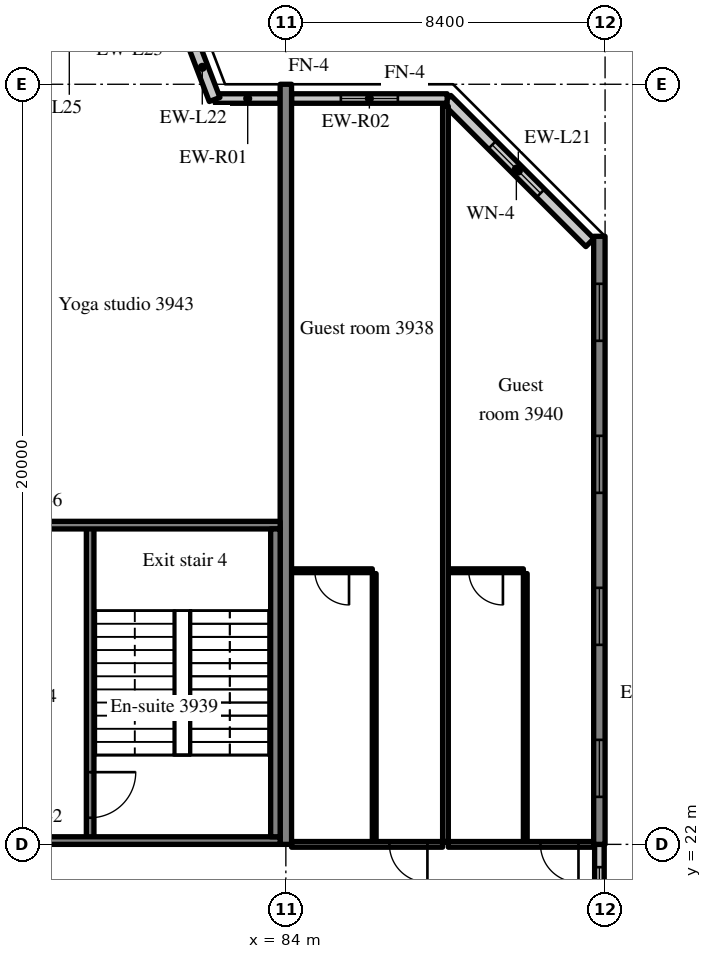
"""IFC4 building model, lengths in metres.
Left out: names, types, materials, properties, quantities, classifications, styles, units other than length and angle.
Written with IfcOpenShell. Run it as: python <this file> out.ifc"""

import sys

from ifc_helpers import new_model, si_unit, direction, frame, frame_2d, origin, place, context, subcontext, project, spatial, rectangle, extrude, source, transform, mapped, element, fill, save


model = new_model("IFC4")
c1 = context("Model", 3, precision=1e-05, world=origin(), true_north=direction((0.0, 1.0)))
c2 = subcontext(c1, "Body", "Model", "MODEL_VIEW")
j1 = project(units=[si_unit("LENGTHUNIT", "METRE"), si_unit("PLANEANGLEUNIT", "RADIAN")], contexts=[c1])
p1 = place(None, origin())
s1 = spatial("IfcSite", under=j1, at=p1, CompositionType="ELEMENT")
p2 = place(p1, origin())
s2 = spatial("IfcBuilding", under=s1, at=p2, CompositionType="ELEMENT")
p3 = place(p2, frame((0.0, 0.0, 163.0)))
s3 = spatial("IfcBuildingStorey", under=s2, at=p3, CompositionType="ELEMENT", Elevation=163.0)
m1 = source(origin(), c2, "Body", "SweptSolid", [
    extrude(rectangle(XDim=20.0, YDim=0.3, at=frame_2d((10.0, 0.0))), origin(), (0.0, 0.0, 1.0), 3.52),
])
p4 = place(p3, frame((84.0, 22.0, 0.0), z_axis=(0.0, 0.0, 1.0), x_axis=(0.0, 1.0, 0.0)))
e1 = element("IfcWall", 1, at=p4, inside=s3, PredefinedType="SHEAR", context=c2, shape_type="MappedRepresentation", body=[
    mapped(m1, transform((0.0, 0.0, 0.0), scale=1.0)),
])
m2 = source(origin(), c2, "Body", "SweptSolid", [
    extrude(rectangle(XDim=16.0, YDim=0.3, at=frame_2d((8.0, 0.0))), origin(), (0.0, 0.0, 1.0), 3.52),
])
p5 = place(p3, frame((92.25, 22.0, 0.0), z_axis=(0.0, 0.0, 1.0), x_axis=(0.0, 1.0, 0.0)))
e2 = element("IfcWall", 2, at=p5, inside=s3, PredefinedType="SHEAR", context=c2, shape_type="MappedRepresentation", body=[
    mapped(m2, transform((0.0, 0.0, 0.0), scale=1.0)),
])
m3 = source(origin(), c2, "Body", "SweptSolid", [
    extrude(rectangle(XDim=1.5, YDim=1.5, at=frame_2d((0.75, 0.75))), frame((0.0, 0.16, 0.0), z_axis=(0.0, -1.0, 0.0), x_axis=(1.0, 0.0, 0.0)), (0.0, 0.0, 1.0), 0.32),
])
p6 = place(p5, frame((1.25, 0.0, 0.9)))
e3 = element("IfcOpeningElement", 3, at=p6, cuts=e2, PredefinedType="OPENING", context=c2, shape_type="MappedRepresentation", body=[
    mapped(m3, transform((0.0, 0.0, 0.0), scale=1.0)),
])
p7 = place(p5, frame((5.25, 0.0, 0.9)))
e4 = element("IfcOpeningElement", 4, at=p7, cuts=e2, PredefinedType="OPENING", context=c2, shape_type="MappedRepresentation", body=[
    mapped(m3, transform((0.0, 0.0, 0.0), scale=1.0)),
])
p8 = place(p5, frame((9.25, 0.0, 0.9)))
e5 = element("IfcOpeningElement", 5, at=p8, cuts=e2, PredefinedType="OPENING", context=c2, shape_type="MappedRepresentation", body=[
    mapped(m3, transform((0.0, 0.0, 0.0), scale=1.0)),
])
p9 = place(p5, frame((13.25, 0.0, 0.9)))
e6 = element("IfcOpeningElement", 6, at=p9, cuts=e2, PredefinedType="OPENING", context=c2, shape_type="MappedRepresentation", body=[
    mapped(m3, transform((0.0, 0.0, 0.0), scale=1.0)),
])
m4 = source(origin(), c2, "Body", "SweptSolid", [
    extrude(rectangle(XDim=5.326, YDim=0.3, at=frame_2d((2.663, 0.0))), origin(), (0.0, 0.0, 1.0), 3.52),
])
p10 = place(p3, frame((92.0, 37.834, 0.0), z_axis=(0.0, 0.0, 1.0), x_axis=(-0.707083859269, 0.707129702361, 0.0)))
e7 = element("IfcWall", 7, at=p10, inside=s3, PredefinedType="SOLIDWALL", context=c2, shape_type="MappedRepresentation", body=[
    mapped(m4, transform((0.0, 0.0, 0.0), scale=1.0)),
])
m5 = source(origin(), c2, "Body", "SweptSolid", [
    extrude(rectangle(XDim=1.8, YDim=1.5, at=frame_2d((0.9, 0.75))), frame((0.0, 0.16, 0.0), z_axis=(0.0, -1.0, 0.0), x_axis=(1.0, 0.0, 0.0)), (0.0, 0.0, 1.0), 0.32),
])
p11 = place(p10, frame((1.836, 0.0, 0.9)))
e8 = element("IfcOpeningElement", 8, at=p11, cuts=e7, PredefinedType="OPENING", context=c2, shape_type="MappedRepresentation", body=[
    mapped(m5, transform((0.0, 0.0, 0.0), scale=1.0)),
])
m6 = source(origin(), c2, "Body", "SweptSolid", [
    extrude(rectangle(XDim=1.708, YDim=0.25, at=frame_2d((0.854, 0.0))), origin(), (0.0, 0.0, 1.0), 2.87),
])
p12 = place(p3, frame((83.85, 41.625, 0.0), z_axis=(0.0, 0.0, 1.0), x_axis=(-1.0, 0.0, 0.0)))
e9 = element("IfcWall", 9, at=p12, inside=s3, PredefinedType="SOLIDWALL", context=c2, shape_type="MappedRepresentation", body=[
    mapped(m6, transform((0.0, 0.0, 0.0), scale=1.0)),
])
m7 = source(origin(), c2, "Body", "SweptSolid", [
    extrude(rectangle(XDim=4.095, YDim=0.25, at=frame_2d((2.047, 0.0))), origin(), (0.0, 0.0, 1.0), 2.87),
])
p13 = place(p3, frame((88.245, 41.625, 0.0), z_axis=(0.0, 0.0, 1.0), x_axis=(-1.0, 0.0, 0.0)))
e10 = element("IfcWall", 10, at=p13, inside=s3, PredefinedType="SOLIDWALL", context=c2, shape_type="MappedRepresentation", body=[
    mapped(m7, transform((0.0, 0.0, 0.0), scale=1.0)),
])
m8 = source(origin(), c2, "Body", "SweptSolid", [
    extrude(rectangle(XDim=1.5, YDim=1.5, at=frame_2d((0.75, 0.75))), frame((0.0, 0.135, 0.0), z_axis=(0.0, -1.0, 0.0), x_axis=(1.0, 0.0, 0.0)), (0.0, 0.0, 1.0), 0.27),
])
p14 = place(p13, frame((1.297, 0.0, 0.9)))
e11 = element("IfcOpeningElement", 11, at=p14, cuts=e10, PredefinedType="OPENING", context=c2, shape_type="MappedRepresentation", body=[
    mapped(m8, transform((0.0, 0.0, 0.0), scale=1.0)),
])
m9 = source(origin(), c2, "Body", "SweptSolid", [
    extrude(rectangle(XDim=1.812, YDim=0.3, at=frame_2d((0.906, 0.0))), origin(), (0.0, 0.0, 1.0), 3.52),
])
p15 = place(p3, frame((82.125, 41.6, 0.0), z_axis=(0.0, 0.0, 1.0), x_axis=(-0.357877270961, 0.93376863244, 0.0)))
e12 = element("IfcWall", 12, at=p15, inside=s3, PredefinedType="SOLIDWALL", context=c2, shape_type="MappedRepresentation", body=[
    mapped(m9, transform((0.0, 0.0, 0.0), scale=1.0)),
])
m10 = source(origin(), c2, "Body", "SweptSolid", [
    extrude(rectangle(XDim=2.4, YDim=0.25, at=frame_2d((1.2, 0.0))), origin(), (0.0, 0.0, 1.0), 2.62),
])
p16 = place(p3, frame((92.25, 19.6, 0.0), z_axis=(0.0, 0.0, 1.0), x_axis=(0.0, 1.0, 0.0)))
e13 = element("IfcWall", 13, at=p16, inside=s3, PredefinedType="SOLIDWALL", context=c2, shape_type="MappedRepresentation", body=[
    mapped(m10, transform((0.0, 0.0, 0.0), scale=1.0)),
])
m11 = source(origin(), c2, "Body", "SweptSolid", [
    extrude(rectangle(XDim=1.2, YDim=1.5, at=frame_2d((0.6, 0.75))), frame((0.0, 0.135, 0.0), z_axis=(0.0, -1.0, 0.0), x_axis=(1.0, 0.0, 0.0)), (0.0, 0.0, 1.0), 0.27),
])
p17 = place(p16, frame((0.6, 0.0, 0.9)))
e14 = element("IfcOpeningElement", 14, at=p17, cuts=e13, PredefinedType="OPENING", context=c2, shape_type="MappedRepresentation", body=[
    mapped(m11, transform((0.0, 0.0, 0.0), scale=1.0)),
])
m12 = source(origin(), c2, "Body", "SweptSolid", [
    extrude(rectangle(XDim=8.3, YDim=0.2, at=frame_2d((4.15, 0.0))), origin(), (0.0, 0.0, 1.0), 3.52),
])
p18 = place(p3, frame((78.85, 22.1, 0.0), z_axis=(0.0, 0.0, 1.0), x_axis=(0.0, 1.0, 0.0)))
e15 = element("IfcWall", 15, at=p18, inside=s3, PredefinedType="SOLIDWALL", context=c2, shape_type="MappedRepresentation", body=[
    mapped(m12, transform((0.0, 0.0, 0.0), scale=1.0)),
])
m13 = source(origin(), c2, "Body", "SweptSolid", [
    extrude(rectangle(XDim=1.2, YDim=2.1, at=frame_2d((0.6, 1.05))), frame((0.0, 0.11, 0.0), z_axis=(0.0, -1.0, 0.0), x_axis=(1.0, 0.0, 0.0)), (0.0, 0.0, 1.0), 0.22),
])
p19 = place(p18, frame((0.6, 0.0, 0.0)))
e16 = element("IfcOpeningElement", 16, at=p19, cuts=e15, PredefinedType="OPENING", context=c2, shape_type="MappedRepresentation", body=[
    mapped(m13, transform((0.0, 0.0, 0.0), scale=1.0)),
])
m14 = source(origin(), c2, "Body", "SweptSolid", [
    extrude(rectangle(XDim=8.25, YDim=0.2, at=frame_2d((4.125, 0.0))), origin(), (0.0, 0.0, 1.0), 3.52),
])
p20 = place(p3, frame((83.85, 22.1, 0.0), z_axis=(0.0, 0.0, 1.0), x_axis=(-1.0, 0.0, 0.0)))
e17 = element("IfcWall", 17, at=p20, inside=s3, PredefinedType="SOLIDWALL", context=c2, shape_type="MappedRepresentation", body=[
    mapped(m14, transform((0.0, 0.0, 0.0), scale=1.0)),
])
p21 = place(p20, frame((6.05, 0.0, 0.0)))
e18 = element("IfcOpeningElement", 18, at=p21, cuts=e17, PredefinedType="OPENING", context=c2, shape_type="MappedRepresentation", body=[
    mapped(m13, transform((0.0, 0.0, 0.0), scale=1.0)),
])
p22 = place(p3, frame((83.85, 30.4, 0.0), z_axis=(0.0, 0.0, 1.0), x_axis=(-1.0, 0.0, 0.0)))
e19 = element("IfcWall", 19, at=p22, inside=s3, PredefinedType="SOLIDWALL", context=c2, shape_type="MappedRepresentation", body=[
    mapped(m14, transform((0.0, 0.0, 0.0), scale=1.0)),
])
m15 = source(origin(), c2, "Body", "SweptSolid", [
    extrude(rectangle(XDim=1.0, YDim=2.1, at=frame_2d((0.5, 1.05))), frame((0.0, 0.11, 0.0), z_axis=(0.0, -1.0, 0.0), x_axis=(1.0, 0.0, 0.0)), (0.0, 0.0, 1.0), 0.22),
])
p23 = place(p22, frame((6.15, 0.0, 0.0)))
e20 = element("IfcOpeningElement", 20, at=p23, cuts=e19, PredefinedType="OPENING", context=c2, shape_type="MappedRepresentation", body=[
    mapped(m15, transform((0.0, 0.0, 0.0), scale=1.0)),
])
m16 = source(origin(), c2, "Body", "SweptSolid", [
    extrude(rectangle(XDim=8.1, YDim=0.25, at=frame_2d((4.05, 0.0))), origin(), (0.0, 0.0, 1.0), 3.52),
])
p24 = place(p3, frame((83.725, 22.2, 0.0), z_axis=(0.0, 0.0, 1.0), x_axis=(0.0, 1.0, 0.0)))
e21 = element("IfcWall", 21, at=p24, inside=s3, PredefinedType="SOLIDWALL", context=c2, shape_type="MappedRepresentation", body=[
    mapped(m16, transform((0.0, 0.0, 0.0), scale=1.0)),
])
m17 = source(origin(), c2, "Body", "SweptSolid", [
    extrude(rectangle(XDim=7.05, YDim=0.1, at=frame_2d((3.525, 0.0))), origin(), (0.0, 0.0, 1.0), 3.52),
])
p25 = place(p3, frame((86.325, 22.075, 0.0), z_axis=(0.0, 0.0, 1.0), x_axis=(0.0, 1.0, 0.0)))
e22 = element("IfcWall", 22, at=p25, inside=s3, PredefinedType="PARTITIONING", context=c2, shape_type="MappedRepresentation", body=[
    mapped(m17, transform((0.0, 0.0, 0.0), scale=1.0)),
])
m18 = source(origin(), c2, "Body", "SweptSolid", [
    extrude(rectangle(XDim=2.125, YDim=0.1, at=frame_2d((1.062, 0.0))), origin(), (0.0, 0.0, 1.0), 3.52),
])
p26 = place(p3, frame((84.15, 29.2, 0.0), z_axis=(0.0, 0.0, 1.0), x_axis=(1.0, 0.0, 0.0)))
e23 = element("IfcWall", 23, at=p26, inside=s3, PredefinedType="PARTITIONING", context=c2, shape_type="MappedRepresentation", body=[
    mapped(m18, transform((0.0, 0.0, 0.0), scale=1.0)),
])
m19 = source(origin(), c2, "Body", "SweptSolid", [
    extrude(rectangle(XDim=0.9, YDim=2.1, at=frame_2d((0.45, 1.05))), frame((0.0, 0.06, 0.0), z_axis=(0.0, -1.0, 0.0), x_axis=(1.0, 0.0, 0.0)), (0.0, 0.0, 1.0), 0.12),
])
p27 = place(p26, frame((0.612, 0.0, 0.0)))
e24 = element("IfcOpeningElement", 24, at=p27, cuts=e23, PredefinedType="OPENING", context=c2, shape_type="MappedRepresentation", body=[
    mapped(m19, transform((0.0, 0.0, 0.0), scale=1.0)),
])
m20 = source(origin(), c2, "Body", "SweptSolid", [
    extrude(rectangle(XDim=3.975, YDim=0.15, at=frame_2d((1.988, 0.0))), origin(), (0.0, 0.0, 1.0), 2.82),
])
p28 = place(p3, frame((84.15, 22.0, 0.0), z_axis=(0.0, 0.0, 1.0), x_axis=(1.0, 0.0, 0.0)))
e25 = element("IfcWall", 25, at=p28, inside=s3, PredefinedType="PARTITIONING", context=c2, shape_type="MappedRepresentation", body=[
    mapped(m20, transform((0.0, 0.0, 0.0), scale=1.0)),
])
m21 = source(origin(), c2, "Body", "SweptSolid", [
    extrude(rectangle(XDim=1.0, YDim=2.1, at=frame_2d((0.5, 1.05))), frame((0.0, 0.085, 0.0), z_axis=(0.0, -1.0, 0.0), x_axis=(1.0, 0.0, 0.0)), (0.0, 0.0, 1.0), 0.17),
])
p29 = place(p28, frame((2.575, 0.0, 0.0)))
e26 = element("IfcOpeningElement", 26, at=p29, cuts=e25, PredefinedType="OPENING", context=c2, shape_type="MappedRepresentation", body=[
    mapped(m21, transform((0.0, 0.0, 0.0), scale=1.0)),
])
p30 = place(p3, frame((90.3, 22.075, 0.0), z_axis=(0.0, 0.0, 1.0), x_axis=(0.0, 1.0, 0.0)))
e27 = element("IfcWall", 27, at=p30, inside=s3, PredefinedType="PARTITIONING", context=c2, shape_type="MappedRepresentation", body=[
    mapped(m17, transform((0.0, 0.0, 0.0), scale=1.0)),
])
m22 = source(origin(), c2, "Body", "SweptSolid", [
    extrude(rectangle(XDim=1.975, YDim=0.1, at=frame_2d((0.988, 0.0))), origin(), (0.0, 0.0, 1.0), 3.52),
])
p31 = place(p3, frame((88.275, 29.2, 0.0), z_axis=(0.0, 0.0, 1.0), x_axis=(1.0, 0.0, 0.0)))
e28 = element("IfcWall", 28, at=p31, inside=s3, PredefinedType="PARTITIONING", context=c2, shape_type="MappedRepresentation", body=[
    mapped(m22, transform((0.0, 0.0, 0.0), scale=1.0)),
])
p32 = place(p31, frame((0.537, 0.0, 0.0)))
e29 = element("IfcOpeningElement", 29, at=p32, cuts=e28, PredefinedType="OPENING", context=c2, shape_type="MappedRepresentation", body=[
    mapped(m19, transform((0.0, 0.0, 0.0), scale=1.0)),
])
m23 = source(origin(), c2, "Body", "SweptSolid", [
    extrude(rectangle(XDim=3.825, YDim=0.15, at=frame_2d((1.913, 0.0))), origin(), (0.0, 0.0, 1.0), 2.82),
])
p33 = place(p3, frame((88.275, 22.0, 0.0), z_axis=(0.0, 0.0, 1.0), x_axis=(1.0, 0.0, 0.0)))
e30 = element("IfcWall", 30, at=p33, inside=s3, PredefinedType="PARTITIONING", context=c2, shape_type="MappedRepresentation", body=[
    mapped(m23, transform((0.0, 0.0, 0.0), scale=1.0)),
])
p34 = place(p33, frame((2.425, 0.0, 0.0)))
e31 = element("IfcOpeningElement", 31, at=p34, cuts=e30, PredefinedType="OPENING", context=c2, shape_type="MappedRepresentation", body=[
    mapped(m21, transform((0.0, 0.0, 0.0), scale=1.0)),
])
m24 = source(origin(), c2, "Body", "SweptSolid", [
    extrude(rectangle(XDim=19.347, YDim=0.15, at=frame_2d((9.674, 0.0))), origin(), (0.0, 0.0, 1.0), 3.52),
])
p35 = place(p3, frame((88.2, 22.075, 0.0), z_axis=(0.0, 0.0, 1.0), x_axis=(0.0, 1.0, 0.0)))
e32 = element("IfcWall", 32, at=p35, inside=s3, PredefinedType="PARTITIONING", context=c2, shape_type="MappedRepresentation", body=[
    mapped(m24, transform((0.0, 0.0, 0.0), scale=1.0)),
])
m25 = source(origin(), c2, "Body", "SweptSolid", [
    extrude(rectangle(XDim=1.8, YDim=1.5, at=frame_2d((0.9, 0.75))), frame((0.0, 0.03, 0.0), z_axis=(0.0, -1.0, 0.0), x_axis=(1.0, 0.0, 0.0)), (0.0, 0.0, 1.0), 0.06),
])
p36 = place(p11, origin())
e33 = element("IfcWindow", 33, at=p36, inside=s3, PartitioningType="SINGLE_PANEL", PredefinedType="WINDOW", context=c2, shape_type="MappedRepresentation", body=[
    mapped(m25, transform((0.0, 0.0, 0.0), scale=1.0)),
])
fill(e8, e33)
m26 = source(origin(), c2, "Body", "SweptSolid", [
    extrude(rectangle(XDim=1.5, YDim=1.5, at=frame_2d((0.75, 0.75))), frame((0.0, 0.03, 0.0), z_axis=(0.0, -1.0, 0.0), x_axis=(1.0, 0.0, 0.0)), (0.0, 0.0, 1.0), 0.06),
])
p37 = place(p14, origin())
e34 = element("IfcWindow", 34, at=p37, inside=s3, PartitioningType="SINGLE_PANEL", PredefinedType="WINDOW", context=c2, shape_type="MappedRepresentation", body=[
    mapped(m26, transform((0.0, 0.0, 0.0), scale=1.0)),
])
fill(e11, e34)
p38 = place(p6, origin())
e35 = element("IfcWindow", 35, at=p38, inside=s3, PartitioningType="SINGLE_PANEL", PredefinedType="WINDOW", context=c2, shape_type="MappedRepresentation", body=[
    mapped(m26, transform((0.0, 0.0, 0.0), scale=1.0)),
])
fill(e3, e35)
p39 = place(p7, origin())
e36 = element("IfcWindow", 36, at=p39, inside=s3, PartitioningType="SINGLE_PANEL", PredefinedType="WINDOW", context=c2, shape_type="MappedRepresentation", body=[
    mapped(m26, transform((0.0, 0.0, 0.0), scale=1.0)),
])
fill(e4, e36)
p40 = place(p8, origin())
e37 = element("IfcWindow", 37, at=p40, inside=s3, PartitioningType="SINGLE_PANEL", PredefinedType="WINDOW", context=c2, shape_type="MappedRepresentation", body=[
    mapped(m26, transform((0.0, 0.0, 0.0), scale=1.0)),
])
fill(e5, e37)
p41 = place(p9, origin())
e38 = element("IfcWindow", 38, at=p41, inside=s3, PartitioningType="SINGLE_PANEL", PredefinedType="WINDOW", context=c2, shape_type="MappedRepresentation", body=[
    mapped(m26, transform((0.0, 0.0, 0.0), scale=1.0)),
])
fill(e6, e38)
m27 = source(origin(), c2, "Body", "SweptSolid", [
    extrude(rectangle(XDim=1.2, YDim=1.5, at=frame_2d((0.6, 0.75))), frame((0.0, 0.03, 0.0), z_axis=(0.0, -1.0, 0.0), x_axis=(1.0, 0.0, 0.0)), (0.0, 0.0, 1.0), 0.06),
])
p42 = place(p17, origin())
e39 = element("IfcWindow", 39, at=p42, inside=s3, PartitioningType="SINGLE_PANEL", PredefinedType="WINDOW", context=c2, shape_type="MappedRepresentation", body=[
    mapped(m27, transform((0.0, 0.0, 0.0), scale=1.0)),
])
fill(e14, e39)
m28 = source(origin(), c2, "Body", "SweptSolid", [
    extrude(rectangle(XDim=1.2, YDim=2.1, at=frame_2d((0.6, 1.05))), frame((0.0, 0.025, 0.0), z_axis=(0.0, -1.0, 0.0), x_axis=(1.0, 0.0, 0.0)), (0.0, 0.0, 1.0), 0.05),
])
p43 = place(p19, origin())
e40 = element("IfcDoor", 40, at=p43, inside=s3, OperationType="SINGLE_SWING_RIGHT", PredefinedType="DOOR", context=c2, shape_type="MappedRepresentation", body=[
    mapped(m28, transform((0.0, 0.0, 0.0), scale=1.0)),
])
fill(e16, e40)
m29 = source(origin(), c2, "Body", "SweptSolid", [
    extrude(rectangle(XDim=0.9, YDim=2.1, at=frame_2d((0.45, 1.05))), frame((0.0, 0.025, 0.0), z_axis=(0.0, -1.0, 0.0), x_axis=(1.0, 0.0, 0.0)), (0.0, 0.0, 1.0), 0.05),
])
p44 = place(p27, origin())
e41 = element("IfcDoor", 41, at=p44, inside=s3, OperationType="SINGLE_SWING_RIGHT", PredefinedType="DOOR", context=c2, shape_type="MappedRepresentation", body=[
    mapped(m29, transform((0.0, 0.0, 0.0), scale=1.0)),
])
fill(e24, e41)
m30 = source(origin(), c2, "Body", "SweptSolid", [
    extrude(rectangle(XDim=1.0, YDim=2.1, at=frame_2d((0.5, 1.05))), frame((0.0, 0.025, 0.0), z_axis=(0.0, -1.0, 0.0), x_axis=(1.0, 0.0, 0.0)), (0.0, 0.0, 1.0), 0.05),
])
p45 = place(p29, origin())
e42 = element("IfcDoor", 42, at=p45, inside=s3, OperationType="SINGLE_SWING_RIGHT", PredefinedType="DOOR", context=c2, shape_type="MappedRepresentation", body=[
    mapped(m30, transform((0.0, 0.0, 0.0), scale=1.0)),
])
fill(e26, e42)
p46 = place(p32, origin())
e43 = element("IfcDoor", 43, at=p46, inside=s3, OperationType="SINGLE_SWING_RIGHT", PredefinedType="DOOR", context=c2, shape_type="MappedRepresentation", body=[
    mapped(m29, transform((0.0, 0.0, 0.0), scale=1.0)),
])
fill(e29, e43)
p47 = place(p34, origin())
e44 = element("IfcDoor", 44, at=p47, inside=s3, OperationType="SINGLE_SWING_RIGHT", PredefinedType="DOOR", context=c2, shape_type="MappedRepresentation", body=[
    mapped(m30, transform((0.0, 0.0, 0.0), scale=1.0)),
])
fill(e31, e44)
save(model, sys.argv[1])
